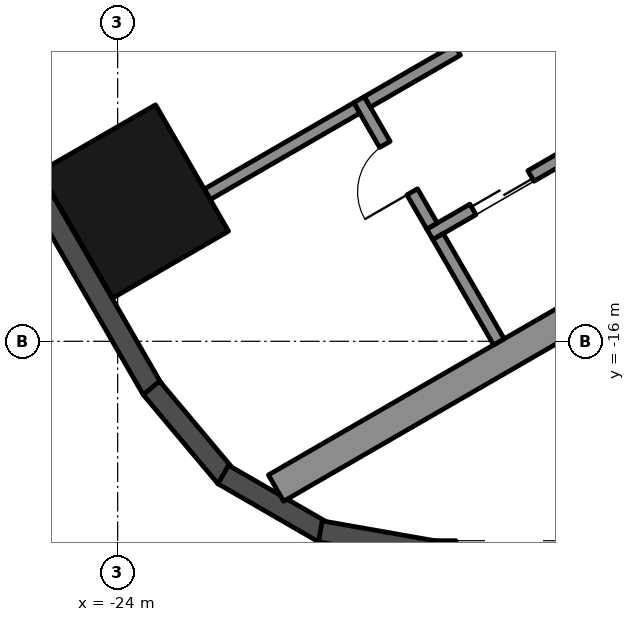
"""IFC4 building model, lengths in metres.
Left out: names, types, materials, properties, quantities, classifications, styles, units other than length and angle.
Written with IfcOpenShell. Run it as: python <this file> out.ifc"""

import sys

from ifc_helpers import new_model, si_unit, direction, frame, frame_2d, origin, origin_2d, place, context, subcontext, project, spatial, rectangle, hollow_rectangle, extrude, element, fill, save


model = new_model("IFC4")
c1 = context("Model", 3, precision=1e-05, world=origin(), true_north=direction((0.0, 1.0)))
c2 = subcontext(c1, "Body", "Model", "MODEL_VIEW")
j1 = project(units=[si_unit("LENGTHUNIT", "METRE"), si_unit("PLANEANGLEUNIT", "RADIAN")], contexts=[c1])
p1 = place(None, origin())
s1 = spatial("IfcSite", under=j1, at=p1, CompositionType="ELEMENT")
p2 = place(p1, origin())
s2 = spatial("IfcBuilding", under=s1, at=p2, CompositionType="ELEMENT")
p3 = place(p2, frame((0.0, 0.0, 213.2)))
s3 = spatial("IfcBuildingStorey", under=s2, at=p3, CompositionType="ELEMENT", Elevation=213.2)
p4 = place(p3, frame((-23.729, -13.7, 0.0), z_axis=(0.0, 0.0, 1.0), x_axis=(-0.5, 0.866025403784, 0.0)))
e1 = element("IfcColumn", 1, at=p4, inside=s3, PredefinedType="COLUMN", context=c2, shape_type="SweptSolid", body=[
    extrude(hollow_rectangle(XDim=2.4, YDim=2.2, WallThickness=0.06, at=origin_2d()), origin(), (0.0, 0.0, 1.0), 3.7),
])
p5 = place(p3, frame((-26.257, -11.893, 0.0), z_axis=(0.0, 0.0, 1.0), x_axis=(0.500018773155, -0.866014564827, 0.0)))
e2 = element("IfcWall", 2, at=p5, inside=s3, PredefinedType="SOLIDWALL", context=c2, shape_type="SweptSolid", body=[
    extrude(rectangle(XDim=5.658, YDim=0.35, at=frame_2d((2.829, 0.0))), origin(), (0.0, 0.0, 1.0), 3.55),
])
for number, where, z_axis, x_axis in (
    (3, (-23.445, -16.768, 0.0), (0.0, 0.0, 1.0), (0.643, -0.766, 0.0)),
    (4, (-22.264, -18.192, 0.0), (0.0, 0.0, 1.0), (0.866, -0.5, 0.0)),
):
    element("IfcWall", number, at=place(p3, frame(where, z_axis=z_axis, x_axis=x_axis)), inside=s3, PredefinedType="SOLIDWALL", context=c2, shape_type="SweptSolid", body=[
        extrude(rectangle(XDim=1.91, YDim=0.35, at=frame_2d((0.955, 0.0))), origin(), (0.0, 0.0, 1.0), 3.55),
    ])
p6 = place(p3, frame((-20.667, -19.126, 0.0), z_axis=(0.0, 0.0, 1.0), x_axis=(0.984798995425, -0.173697837091, 0.0)))
e5 = element("IfcWall", 5, at=p6, inside=s3, PredefinedType="SOLIDWALL", context=c2, shape_type="SweptSolid", body=[
    extrude(rectangle(XDim=1.91, YDim=0.35, at=frame_2d((0.955, 0.0))), origin(), (0.0, 0.0, 1.0), 3.55),
])
p7 = place(p3, frame((-18.816, -19.455, 0.0), z_axis=(0.0, 0.0, 1.0), x_axis=(1.0, 0.0, 0.0)))
e6 = element("IfcWall", 6, at=p7, inside=s3, PredefinedType="SOLIDWALL", context=c2, shape_type="SweptSolid", body=[
    extrude(rectangle(XDim=11.816, YDim=0.35, at=frame_2d((5.908, 0.0))), origin(), (0.0, 0.0, 1.0), 3.55),
])
p8 = place(p7, frame((0.381, 0.0, 0.3)))
e7 = element("IfcOpeningElement", 7, at=p8, cuts=e6, PredefinedType="OPENING", context=c2, shape_type="SweptSolid", body=[
    extrude(rectangle(XDim=1.9, YDim=2.65, at=frame_2d((0.95, 1.325))), frame((0.0, 0.185, 0.0), z_axis=(0.0, -1.0, 0.0), x_axis=(1.0, 0.0, 0.0)), (0.0, 0.0, 1.0), 0.37),
])
p9 = place(p7, frame((7.79, 0.0, 0.0)))
e8 = element("IfcOpeningElement", 8, at=p9, cuts=e6, PredefinedType="OPENING", context=c2, shape_type="SweptSolid", body=[
    extrude(rectangle(XDim=2.4, YDim=2.4, at=frame_2d((1.2, 1.2))), frame((0.0, 0.185, 0.0), z_axis=(0.0, -1.0, 0.0), x_axis=(1.0, 0.0, 0.0)), (0.0, 0.0, 1.0), 0.37),
])
p10 = place(p7, frame((3.741, 0.0, 0.3)))
e9 = element("IfcOpeningElement", 9, at=p10, cuts=e6, PredefinedType="OPENING", context=c2, shape_type="SweptSolid", body=[
    extrude(rectangle(XDim=1.7, YDim=2.65, at=frame_2d((0.85, 1.325))), frame((0.0, 0.185, 0.0), z_axis=(0.0, -1.0, 0.0), x_axis=(1.0, 0.0, 0.0)), (0.0, 0.0, 1.0), 0.37),
])
p11 = place(p7, frame((5.741, 0.0, 0.3)))
e10 = element("IfcOpeningElement", 10, at=p11, cuts=e6, PredefinedType="OPENING", context=c2, shape_type="SweptSolid", body=[
    extrude(rectangle(XDim=1.7, YDim=2.65, at=frame_2d((0.85, 1.325))), frame((0.0, 0.185, 0.0), z_axis=(0.0, -1.0, 0.0), x_axis=(1.0, 0.0, 0.0)), (0.0, 0.0, 1.0), 0.37),
])
p12 = place(p3, frame((-8.547, -10.997, 0.0), z_axis=(0.0, 0.0, 1.0), x_axis=(-0.866025009528, -0.500000682871, 0.0)))
e11 = element("IfcWall", 11, at=p12, inside=s3, PredefinedType="SHEAR", context=c2, shape_type="SweptSolid", body=[
    extrude(rectangle(XDim=14.837, YDim=0.5, at=frame_2d((7.418, 0.0))), origin(), (0.0, 0.0, 1.0), 3.5),
])
p13 = place(p3, frame((-10.068, -9.162, 0.0), z_axis=(0.0, 0.0, 1.0), x_axis=(-0.866032725843, -0.499987317609, 0.0)))
e12 = element("IfcWall", 12, at=p13, inside=s3, PredefinedType="SHEAR", context=c2, shape_type="SweptSolid", body=[
    extrude(rectangle(XDim=10.16, YDim=0.2, at=frame_2d((5.08, 0.0))), origin(), (0.0, 0.0, 1.0), 3.5),
])
p14 = place(p13, frame((0.62, 0.0, 0.0)))
e13 = element("IfcOpeningElement", 13, at=p14, cuts=e12, PredefinedType="OPENING", context=c2, shape_type="SweptSolid", body=[
    extrude(rectangle(XDim=1.1, YDim=2.1, at=frame_2d((0.55, 1.05))), frame((0.0, 0.11, 0.0), z_axis=(0.0, -1.0, 0.0), x_axis=(1.0, 0.0, 0.0)), (0.0, 0.0, 1.0), 0.22),
])
p15 = place(p13, frame((3.16, 0.0, 0.0)))
e14 = element("IfcOpeningElement", 14, at=p15, cuts=e12, PredefinedType="OPENING", context=c2, shape_type="SweptSolid", body=[
    extrude(rectangle(XDim=1.1, YDim=2.1, at=frame_2d((0.55, 1.05))), frame((0.0, 0.11, 0.0), z_axis=(0.0, -1.0, 0.0), x_axis=(1.0, 0.0, 0.0)), (0.0, 0.0, 1.0), 0.22),
])
p16 = place(p13, frame((5.7, 0.0, 0.0)))
e15 = element("IfcOpeningElement", 15, at=p16, cuts=e12, PredefinedType="OPENING", context=c2, shape_type="SweptSolid", body=[
    extrude(rectangle(XDim=1.1, YDim=2.1, at=frame_2d((0.55, 1.05))), frame((0.0, 0.11, 0.0), z_axis=(0.0, -1.0, 0.0), x_axis=(1.0, 0.0, 0.0)), (0.0, 0.0, 1.0), 0.22),
])
p17 = place(p13, frame((8.24, 0.0, 0.0)))
e16 = element("IfcOpeningElement", 16, at=p17, cuts=e12, PredefinedType="OPENING", context=c2, shape_type="SweptSolid", body=[
    extrude(rectangle(XDim=1.1, YDim=2.1, at=frame_2d((0.55, 1.05))), frame((0.0, 0.11, 0.0), z_axis=(0.0, -1.0, 0.0), x_axis=(1.0, 0.0, 0.0)), (0.0, 0.0, 1.0), 0.22),
])
p18 = place(p3, frame((-20.031, -12.026, 0.0), z_axis=(0.0, 0.0, 1.0), x_axis=(0.500033551112, -0.866006032174, 0.0)))
e17 = element("IfcWall", 17, at=p18, inside=s3, PredefinedType="SHEAR", context=c2, shape_type="SweptSolid", body=[
    extrude(rectangle(XDim=2.4, YDim=0.2, at=frame_2d((1.2, 0.0))), origin(), (0.0, 0.0, 1.0), 3.5),
])
p19 = place(p18, frame((0.85, 0.0, 0.0)))
e18 = element("IfcOpeningElement", 18, at=p19, cuts=e17, PredefinedType="OPENING", context=c2, shape_type="SweptSolid", body=[
    extrude(rectangle(XDim=0.9, YDim=2.1, at=frame_2d((0.45, 1.05))), frame((0.0, 0.11, 0.0), z_axis=(0.0, -1.0, 0.0), x_axis=(1.0, 0.0, 0.0)), (0.0, 0.0, 1.0), 0.22),
])
p20 = place(p3, frame((-18.413, -11.208, 0.0), z_axis=(0.0, 0.0, 1.0), x_axis=(-0.866038183914, -0.499977863513, 0.0)))
e19 = element("IfcWall", 19, at=p20, inside=s3, PredefinedType="SHEAR", context=c2, shape_type="SweptSolid", body=[
    extrude(rectangle(XDim=1.71, YDim=0.2, at=frame_2d((0.855, 0.0))), origin(), (0.0, 0.0, 1.0), 3.5),
])
p21 = place(p3, frame((-18.73, -14.278, 0.0), z_axis=(0.0, 0.0, 1.0), x_axis=(0.50002537861, -0.866010750942, 0.0)))
e20 = element("IfcWall", 20, at=p21, inside=s3, PredefinedType="SHEAR", context=c2, shape_type="SweptSolid", body=[
    extrude(rectangle(XDim=2.0, YDim=0.2, at=frame_2d((1.0, 0.0))), origin(), (0.0, 0.0, 1.0), 3.5),
])
p22 = place(p3, frame((-20.067, -12.163, 0.0), z_axis=(0.0, 0.0, 1.0), x_axis=(-0.866055327414, -0.49994816717, 0.0)))
e21 = element("IfcWall", 21, at=p22, inside=s3, PredefinedType="SHEAR", context=c2, shape_type="SweptSolid", body=[
    extrude(rectangle(XDim=2.84, YDim=0.2, at=frame_2d((1.42, 0.0))), origin(), (0.0, 0.0, 1.0), 3.5),
])
p23 = place(p17, origin())
e22 = element("IfcDoor", 22, at=p23, inside=s3, OperationType="DOUBLE_DOOR_SLIDING", PredefinedType="DOOR", context=c2, shape_type="SweptSolid", body=[
    extrude(rectangle(XDim=1.1, YDim=2.1, at=frame_2d((0.55, 1.05))), frame((0.0, 0.025, 0.0), z_axis=(0.0, -1.0, 0.0), x_axis=(1.0, 0.0, 0.0)), (0.0, 0.0, 1.0), 0.05),
])
fill(e16, e22)
p24 = place(p19, frame((0.9, 0.0, 0.0), z_axis=(0.0, 0.0, 1.0), x_axis=(-1.0, 0.0, 0.0)))
e23 = element("IfcDoor", 23, at=p24, inside=s3, OperationType="SINGLE_SWING_LEFT", PredefinedType="DOOR", context=c2, shape_type="SweptSolid", body=[
    extrude(rectangle(XDim=0.9, YDim=2.1, at=frame_2d((0.45, 1.05))), frame((0.0, 0.025, 0.0), z_axis=(0.0, -1.0, 0.0), x_axis=(1.0, 0.0, 0.0)), (0.0, 0.0, 1.0), 0.05),
])
fill(e18, e23)
save(model, sys.argv[1])
